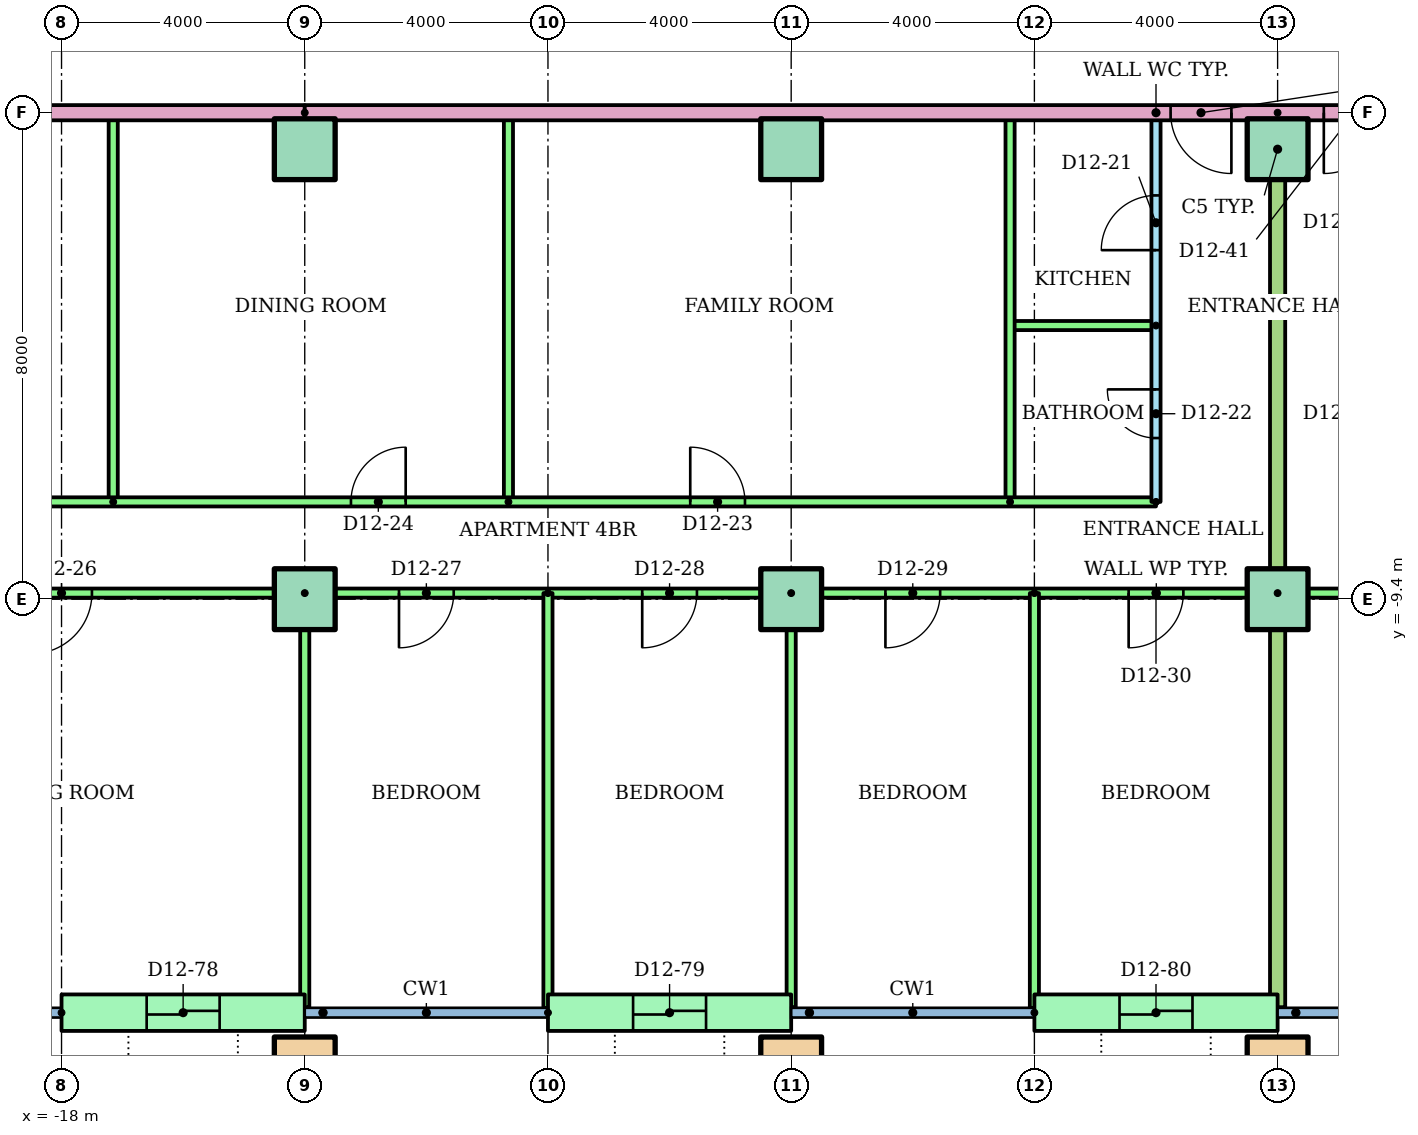
"""IFC4 building model, lengths in metres.
Left out: names, types, materials, properties, quantities, classifications, styles, units other than length and angle.
Written with IfcOpenShell. Run it as: python <this file> out.ifc"""

import sys

from ifc_helpers import new_model, si_unit, direction, frame, frame_2d, origin, origin_2d, place, context, subcontext, project, spatial, rectangle, hollow_rectangle, extrude, element, fill, save


model = new_model("IFC4")
c1 = context("Model", 3, precision=1e-05, world=origin(), true_north=direction((0.0, 1.0)))
c2 = subcontext(c1, "Body", "Model", "MODEL_VIEW")
j1 = project(units=[si_unit("LENGTHUNIT", "METRE"), si_unit("PLANEANGLEUNIT", "RADIAN")], contexts=[c1])
p1 = place(None, origin())
s1 = spatial("IfcSite", under=j1, at=p1, CompositionType="ELEMENT")
p2 = place(p1, origin())
s2 = spatial("IfcBuilding", under=s1, at=p2, CompositionType="ELEMENT")
p3 = place(p2, frame((0.0, 0.0, 48.0)))
s3 = spatial("IfcBuildingStorey", under=s2, at=p3, CompositionType="ELEMENT", Elevation=48.0)
for number, where in (
    (1, (-14.0, -17.1, 0.0)),
    (2, (-6.0, -17.1, 0.0)),
    (3, (2.0, -17.1, 0.0)),
):
    element("IfcColumn", number, at=place(p3, frame(where)), inside=s3, PredefinedType="COLUMN", context=c2, shape_type="SweptSolid", body=[
        extrude(hollow_rectangle(XDim=1.0, YDim=1.0, WallThickness=0.05, at=origin_2d()), origin(), (0.0, 0.0, 1.0), 3.2),
    ])
for number, where in (
    (4, (-14.0, -9.4, 0.0)),
    (5, (-6.0, -9.4, 0.0)),
    (6, (2.0, -9.4, 0.0)),
    (7, (-14.0, -2.0, 0.0)),
    (8, (-6.0, -2.0, 0.0)),
    (9, (2.0, -2.0, 0.0)),
):
    element("IfcColumn", number, at=place(p3, frame(where)), inside=s3, PredefinedType="COLUMN", context=c2, shape_type="SweptSolid", body=[
        extrude(rectangle(XDim=1.0, YDim=1.0, at=origin_2d()), origin(), (0.0, 0.0, 1.0), 3.2),
    ])
p4 = place(p3, frame((-18.0, -16.2, 0.0)))
e10 = element("IfcWall", 10, at=p4, inside=s3, PredefinedType="STANDARD", context=c2, shape_type="SweptSolid", body=[
    extrude(rectangle(XDim=4.0, YDim=0.6, at=frame_2d((2.0, 0.0))), origin(), (0.0, 0.0, 1.0), 2.92),
])
p5 = place(p4, frame((1.4, 0.0, 0.0)))
e11 = element("IfcOpeningElement", 11, at=p5, cuts=e10, PredefinedType="OPENING", context=c2, shape_type="SweptSolid", body=[
    extrude(rectangle(XDim=1.2, YDim=2.1, at=frame_2d((0.6, 1.05))), frame((0.0, 0.31, 0.0), z_axis=(0.0, -1.0, 0.0), x_axis=(1.0, 0.0, 0.0)), (0.0, 0.0, 1.0), 0.62),
])
p6 = place(p3, frame((-10.0, -16.2, 0.0)))
e12 = element("IfcWall", 12, at=p6, inside=s3, PredefinedType="STANDARD", context=c2, shape_type="SweptSolid", body=[
    extrude(rectangle(XDim=4.0, YDim=0.6, at=frame_2d((2.0, 0.0))), origin(), (0.0, 0.0, 1.0), 2.92),
])
p7 = place(p6, frame((1.4, 0.0, 0.0)))
e13 = element("IfcOpeningElement", 13, at=p7, cuts=e12, PredefinedType="OPENING", context=c2, shape_type="SweptSolid", body=[
    extrude(rectangle(XDim=1.2, YDim=2.1, at=frame_2d((0.6, 1.05))), frame((0.0, 0.31, 0.0), z_axis=(0.0, -1.0, 0.0), x_axis=(1.0, 0.0, 0.0)), (0.0, 0.0, 1.0), 0.62),
])
p8 = place(p3, frame((-2.0, -16.2, 0.0)))
e14 = element("IfcWall", 14, at=p8, inside=s3, PredefinedType="STANDARD", context=c2, shape_type="SweptSolid", body=[
    extrude(rectangle(XDim=4.0, YDim=0.6, at=frame_2d((2.0, 0.0))), origin(), (0.0, 0.0, 1.0), 2.92),
])
p9 = place(p8, frame((1.4, 0.0, 0.0)))
e15 = element("IfcOpeningElement", 15, at=p9, cuts=e14, PredefinedType="OPENING", context=c2, shape_type="SweptSolid", body=[
    extrude(rectangle(XDim=1.2, YDim=2.1, at=frame_2d((0.6, 1.05))), frame((0.0, 0.31, 0.0), z_axis=(0.0, -1.0, 0.0), x_axis=(1.0, 0.0, 0.0)), (0.0, 0.0, 1.0), 0.62),
])
p10 = place(p3, frame((0.0, -7.8, 0.0), z_axis=(0.0, 0.0, 1.0), x_axis=(0.0, 1.0, 0.0)))
e16 = element("IfcWall", 16, at=p10, inside=s3, PredefinedType="PARTITIONING", context=c2, shape_type="SweptSolid", body=[
    extrude(rectangle(XDim=6.4, YDim=0.15, at=frame_2d((3.2, 0.0))), origin(), (0.0, 0.0, 1.0), 2.4),
])
p11 = place(p10, frame((4.14, 0.0, 0.0)))
e17 = element("IfcOpeningElement", 17, at=p11, cuts=e16, PredefinedType="OPENING", context=c2, shape_type="SweptSolid", body=[
    extrude(rectangle(XDim=0.9, YDim=2.1, at=frame_2d((0.45, 1.05))), frame((0.0, 0.085, 0.0), z_axis=(0.0, -1.0, 0.0), x_axis=(1.0, 0.0, 0.0)), (0.0, 0.0, 1.0), 0.17),
])
p12 = place(p10, frame((1.05, 0.0, 0.0)))
e18 = element("IfcOpeningElement", 18, at=p12, cuts=e16, PredefinedType="OPENING", context=c2, shape_type="SweptSolid", body=[
    extrude(rectangle(XDim=0.8, YDim=2.1, at=frame_2d((0.4, 1.05))), frame((0.0, 0.085, 0.0), z_axis=(0.0, -1.0, 0.0), x_axis=(1.0, 0.0, 0.0)), (0.0, 0.0, 1.0), 0.17),
])
p13 = place(p3, frame((0.0, -4.9, 0.0), z_axis=(0.0, 0.0, 1.0), x_axis=(-1.0, 0.0, 0.0)))
e19 = element("IfcWall", 19, at=p13, inside=s3, PredefinedType="PARTITIONING", context=c2, shape_type="SweptSolid", body=[
    extrude(rectangle(XDim=2.4, YDim=0.15, at=frame_2d((1.2, 0.0))), origin(), (0.0, 0.0, 1.0), 2.4),
])
for number, where, z_axis, x_axis in (
    (20, (-2.4, -7.8, 0.0), (0.0, 0.0, 1.0), (0.0, 1.0, 0.0)),
    (21, (-10.65, -7.8, 0.0), (0.0, 0.0, 1.0), (0.0, 1.0, 0.0)),
    (22, (-17.15, -7.8, 0.0), (0.0, 0.0, 1.0), (0.0, 1.0, 0.0)),
):
    element("IfcWall", number, at=place(p3, frame(where, z_axis=z_axis, x_axis=x_axis)), inside=s3, PredefinedType="PARTITIONING", context=c2, shape_type="SweptSolid", body=[
        extrude(rectangle(XDim=6.4, YDim=0.15, at=frame_2d((3.2, 0.0))), origin(), (0.0, 0.0, 1.0), 2.4),
    ])
p14 = place(p3, frame((-22.0, -7.8, 0.0)))
e23 = element("IfcWall", 23, at=p14, inside=s3, PredefinedType="PARTITIONING", context=c2, shape_type="SweptSolid", body=[
    extrude(rectangle(XDim=22.0, YDim=0.15, at=frame_2d((11.0, 0.0))), origin(), (0.0, 0.0, 1.0), 2.4),
])
p15 = place(p14, frame((14.34, 0.0, 0.0)))
e24 = element("IfcOpeningElement", 24, at=p15, cuts=e23, PredefinedType="OPENING", context=c2, shape_type="SweptSolid", body=[
    extrude(rectangle(XDim=0.9, YDim=2.1, at=frame_2d((0.45, 1.05))), frame((0.0, 0.085, 0.0), z_axis=(0.0, -1.0, 0.0), x_axis=(1.0, 0.0, 0.0)), (0.0, 0.0, 1.0), 0.17),
])
p16 = place(p14, frame((8.76, 0.0, 0.0)))
e25 = element("IfcOpeningElement", 25, at=p16, cuts=e23, PredefinedType="OPENING", context=c2, shape_type="SweptSolid", body=[
    extrude(rectangle(XDim=0.9, YDim=2.1, at=frame_2d((0.45, 1.05))), frame((0.0, 0.085, 0.0), z_axis=(0.0, -1.0, 0.0), x_axis=(1.0, 0.0, 0.0)), (0.0, 0.0, 1.0), 0.17),
])
p17 = place(p14, frame((1.975, 0.0, 0.0)))
e26 = element("IfcOpeningElement", 26, at=p17, cuts=e23, PredefinedType="OPENING", context=c2, shape_type="SweptSolid", body=[
    extrude(rectangle(XDim=0.9, YDim=2.1, at=frame_2d((0.45, 1.05))), frame((0.0, 0.085, 0.0), z_axis=(0.0, -1.0, 0.0), x_axis=(1.0, 0.0, 0.0)), (0.0, 0.0, 1.0), 0.17),
])
p18 = place(p3, frame((2.0, -9.3, 0.0), z_axis=(0.0, 0.0, 1.0), x_axis=(-1.0, 0.0, 0.0)))
e27 = element("IfcWall", 27, at=p18, inside=s3, PredefinedType="PARTITIONING", context=c2, shape_type="SweptSolid", body=[
    extrude(rectangle(XDim=24.0, YDim=0.15, at=frame_2d((12.0, 0.0))), origin(), (0.0, 0.0, 1.0), 2.4),
])
p19 = place(p18, frame((19.5, 0.0, 0.0)))
e28 = element("IfcOpeningElement", 28, at=p19, cuts=e27, PredefinedType="OPENING", context=c2, shape_type="SweptSolid", body=[
    extrude(rectangle(XDim=1.0, YDim=2.1, at=frame_2d((0.5, 1.05))), frame((0.0, 0.085, 0.0), z_axis=(0.0, -1.0, 0.0), x_axis=(1.0, 0.0, 0.0)), (0.0, 0.0, 1.0), 0.17),
])
p20 = place(p18, frame((13.55, 0.0, 0.0)))
e29 = element("IfcOpeningElement", 29, at=p20, cuts=e27, PredefinedType="OPENING", context=c2, shape_type="SweptSolid", body=[
    extrude(rectangle(XDim=0.9, YDim=2.1, at=frame_2d((0.45, 1.05))), frame((0.0, 0.085, 0.0), z_axis=(0.0, -1.0, 0.0), x_axis=(1.0, 0.0, 0.0)), (0.0, 0.0, 1.0), 0.17),
])
p21 = place(p18, frame((9.55, 0.0, 0.0)))
e30 = element("IfcOpeningElement", 30, at=p21, cuts=e27, PredefinedType="OPENING", context=c2, shape_type="SweptSolid", body=[
    extrude(rectangle(XDim=0.9, YDim=2.1, at=frame_2d((0.45, 1.05))), frame((0.0, 0.085, 0.0), z_axis=(0.0, -1.0, 0.0), x_axis=(1.0, 0.0, 0.0)), (0.0, 0.0, 1.0), 0.17),
])
p22 = place(p18, frame((5.55, 0.0, 0.0)))
e31 = element("IfcOpeningElement", 31, at=p22, cuts=e27, PredefinedType="OPENING", context=c2, shape_type="SweptSolid", body=[
    extrude(rectangle(XDim=0.9, YDim=2.1, at=frame_2d((0.45, 1.05))), frame((0.0, 0.085, 0.0), z_axis=(0.0, -1.0, 0.0), x_axis=(1.0, 0.0, 0.0)), (0.0, 0.0, 1.0), 0.17),
])
p23 = place(p18, frame((1.55, 0.0, 0.0)))
e32 = element("IfcOpeningElement", 32, at=p23, cuts=e27, PredefinedType="OPENING", context=c2, shape_type="SweptSolid", body=[
    extrude(rectangle(XDim=0.9, YDim=2.1, at=frame_2d((0.45, 1.05))), frame((0.0, 0.085, 0.0), z_axis=(0.0, -1.0, 0.0), x_axis=(1.0, 0.0, 0.0)), (0.0, 0.0, 1.0), 0.17),
])
p24 = place(p3, frame((-14.0, -9.3, 0.0), z_axis=(0.0, 0.0, 1.0), x_axis=(0.0, -1.0, 0.0)))
e33 = element("IfcWall", 33, at=p24, inside=s3, PredefinedType="PARTITIONING", context=c2, shape_type="SweptSolid", body=[
    extrude(rectangle(XDim=6.81, YDim=0.15, at=frame_2d((3.405, 0.0))), origin(), (0.0, 0.0, 1.0), 2.4),
])
p25 = place(p3, frame((-10.0, -9.3, 0.0), z_axis=(0.0, 0.0, 1.0), x_axis=(0.0, -1.0, 0.0)))
e34 = element("IfcWall", 34, at=p25, inside=s3, PredefinedType="PARTITIONING", context=c2, shape_type="SweptSolid", body=[
    extrude(rectangle(XDim=6.821, YDim=0.15, at=frame_2d((3.411, 0.0))), origin(), (0.0, 0.0, 1.0), 2.4),
])
p26 = place(p3, frame((-6.0, -9.3, 0.0), z_axis=(0.0, 0.0, 1.0), x_axis=(0.0, -1.0, 0.0)))
e35 = element("IfcWall", 35, at=p26, inside=s3, PredefinedType="PARTITIONING", context=c2, shape_type="SweptSolid", body=[
    extrude(rectangle(XDim=6.81, YDim=0.15, at=frame_2d((3.405, 0.0))), origin(), (0.0, 0.0, 1.0), 2.4),
])
p27 = place(p3, frame((-2.0, -9.3, 0.0), z_axis=(0.0, 0.0, 1.0), x_axis=(0.0, -1.0, 0.0)))
e36 = element("IfcWall", 36, at=p27, inside=s3, PredefinedType="PARTITIONING", context=c2, shape_type="SweptSolid", body=[
    extrude(rectangle(XDim=6.821, YDim=0.15, at=frame_2d((3.411, 0.0))), origin(), (0.0, 0.0, 1.0), 2.4),
])
p28 = place(p3, frame((18.0, -9.3, 0.0), z_axis=(0.0, 0.0, 1.0), x_axis=(-1.0, 0.0, 0.0)))
e37 = element("IfcWall", 37, at=p28, inside=s3, PredefinedType="PARTITIONING", context=c2, shape_type="SweptSolid", body=[
    extrude(rectangle(XDim=16.0, YDim=0.15, at=frame_2d((8.0, 0.0))), origin(), (0.0, 0.0, 1.0), 2.4),
])
p29 = place(p28, frame((13.55, 0.0, 0.0)))
e38 = element("IfcOpeningElement", 38, at=p29, cuts=e37, PredefinedType="OPENING", context=c2, shape_type="SweptSolid", body=[
    extrude(rectangle(XDim=0.9, YDim=2.1, at=frame_2d((0.45, 1.05))), frame((0.0, 0.085, 0.0), z_axis=(0.0, -1.0, 0.0), x_axis=(1.0, 0.0, 0.0)), (0.0, 0.0, 1.0), 0.17),
])
p30 = place(p28, frame((9.55, 0.0, 0.0)))
e39 = element("IfcOpeningElement", 39, at=p30, cuts=e37, PredefinedType="OPENING", context=c2, shape_type="SweptSolid", body=[
    extrude(rectangle(XDim=0.9, YDim=2.1, at=frame_2d((0.45, 1.05))), frame((0.0, 0.085, 0.0), z_axis=(0.0, -1.0, 0.0), x_axis=(1.0, 0.0, 0.0)), (0.0, 0.0, 1.0), 0.17),
])
p31 = place(p28, frame((5.55, 0.0, 0.0)))
e40 = element("IfcOpeningElement", 40, at=p31, cuts=e37, PredefinedType="OPENING", context=c2, shape_type="SweptSolid", body=[
    extrude(rectangle(XDim=0.9, YDim=2.1, at=frame_2d((0.45, 1.05))), frame((0.0, 0.085, 0.0), z_axis=(0.0, -1.0, 0.0), x_axis=(1.0, 0.0, 0.0)), (0.0, 0.0, 1.0), 0.17),
])
p32 = place(p28, frame((1.5, 0.0, 0.0)))
e41 = element("IfcOpeningElement", 41, at=p32, cuts=e37, PredefinedType="OPENING", context=c2, shape_type="SweptSolid", body=[
    extrude(rectangle(XDim=1.0, YDim=2.1, at=frame_2d((0.5, 1.05))), frame((0.0, 0.085, 0.0), z_axis=(0.0, -1.0, 0.0), x_axis=(1.0, 0.0, 0.0)), (0.0, 0.0, 1.0), 0.17),
])
p33 = place(p3, frame((2.0, -1.4, 0.0), z_axis=(0.0, 0.0, 1.0), x_axis=(0.0, -1.0, 0.0)))
e42 = element("IfcWall", 42, at=p33, inside=s3, PredefinedType="PARTITIONING", context=c2, shape_type="SweptSolid", body=[
    extrude(rectangle(XDim=14.71, YDim=0.25, at=frame_2d((7.355, 0.0))), origin(), (0.0, 0.0, 1.0), 2.4),
])
p34 = place(p3, frame((-14.0, -1.4, 0.0), z_axis=(0.0, 0.0, 1.0), x_axis=(-1.0, 0.0, 0.0)))
e43 = element("IfcWall", 43, at=p34, inside=s3, PredefinedType="PARTITIONING", context=c2, shape_type="SweptSolid", body=[
    extrude(rectangle(XDim=15.0, YDim=0.25, at=frame_2d((7.5, 0.0))), origin(), (0.0, 0.0, 1.0), 2.4),
])
p35 = place(p34, frame((8.76, 0.0, 0.0)))
e44 = element("IfcOpeningElement", 44, at=p35, cuts=e43, PredefinedType="OPENING", context=c2, shape_type="SweptSolid", body=[
    extrude(rectangle(XDim=1.0, YDim=2.1, at=frame_2d((0.5, 1.05))), frame((0.0, 0.135, 0.0), z_axis=(0.0, -1.0, 0.0), x_axis=(1.0, 0.0, 0.0)), (0.0, 0.0, 1.0), 0.27),
])
p36 = place(p3, frame((14.0, -1.4, 0.0), z_axis=(0.0, 0.0, 1.0), x_axis=(-1.0, 0.0, 0.0)))
e45 = element("IfcWall", 45, at=p36, inside=s3, PredefinedType="PARTITIONING", context=c2, shape_type="SweptSolid", body=[
    extrude(rectangle(XDim=28.0, YDim=0.25, at=frame_2d((14.0, 0.0))), origin(), (0.0, 0.0, 1.0), 2.4),
])
p37 = place(p36, frame((12.76, 0.0, 0.0)))
e46 = element("IfcOpeningElement", 46, at=p37, cuts=e45, PredefinedType="OPENING", context=c2, shape_type="SweptSolid", body=[
    extrude(rectangle(XDim=1.0, YDim=2.1, at=frame_2d((0.5, 1.05))), frame((0.0, 0.135, 0.0), z_axis=(0.0, -1.0, 0.0), x_axis=(1.0, 0.0, 0.0)), (0.0, 0.0, 1.0), 0.27),
])
p38 = place(p36, frame((10.24, 0.0, 0.0)))
e47 = element("IfcOpeningElement", 47, at=p38, cuts=e45, PredefinedType="OPENING", context=c2, shape_type="SweptSolid", body=[
    extrude(rectangle(XDim=1.0, YDim=2.1, at=frame_2d((0.5, 1.05))), frame((0.0, 0.135, 0.0), z_axis=(0.0, -1.0, 0.0), x_axis=(1.0, 0.0, 0.0)), (0.0, 0.0, 1.0), 0.27),
])
p39 = place(p11, origin())
e48 = element("IfcDoor", 48, at=p39, inside=s3, OperationType="SINGLE_SWING_LEFT", PredefinedType="DOOR", context=c2, shape_type="SweptSolid", body=[
    extrude(rectangle(XDim=0.9, YDim=2.1, at=frame_2d((0.45, 1.05))), frame((0.0, 0.025, 0.0), z_axis=(0.0, -1.0, 0.0), x_axis=(1.0, 0.0, 0.0)), (0.0, 0.0, 1.0), 0.05),
])
fill(e17, e48)
p40 = place(p12, origin())
e49 = element("IfcDoor", 49, at=p40, inside=s3, OperationType="SINGLE_SWING_RIGHT", PredefinedType="DOOR", context=c2, shape_type="SweptSolid", body=[
    extrude(rectangle(XDim=0.8, YDim=2.1, at=frame_2d((0.4, 1.05))), frame((0.0, 0.025, 0.0), z_axis=(0.0, -1.0, 0.0), x_axis=(1.0, 0.0, 0.0)), (0.0, 0.0, 1.0), 0.05),
])
fill(e18, e49)
p41 = place(p15, origin())
e50 = element("IfcDoor", 50, at=p41, inside=s3, OperationType="SINGLE_SWING_LEFT", PredefinedType="DOOR", context=c2, shape_type="SweptSolid", body=[
    extrude(rectangle(XDim=0.9, YDim=2.1, at=frame_2d((0.45, 1.05))), frame((0.0, 0.025, 0.0), z_axis=(0.0, -1.0, 0.0), x_axis=(1.0, 0.0, 0.0)), (0.0, 0.0, 1.0), 0.05),
])
fill(e24, e50)
p42 = place(p16, origin())
e51 = element("IfcDoor", 51, at=p42, inside=s3, OperationType="SINGLE_SWING_RIGHT", PredefinedType="DOOR", context=c2, shape_type="SweptSolid", body=[
    extrude(rectangle(XDim=0.9, YDim=2.1, at=frame_2d((0.45, 1.05))), frame((0.0, 0.025, 0.0), z_axis=(0.0, -1.0, 0.0), x_axis=(1.0, 0.0, 0.0)), (0.0, 0.0, 1.0), 0.05),
])
fill(e25, e51)
p43 = place(p19, origin())
e52 = element("IfcDoor", 52, at=p43, inside=s3, OperationType="SINGLE_SWING_RIGHT", PredefinedType="DOOR", context=c2, shape_type="SweptSolid", body=[
    extrude(rectangle(XDim=1.0, YDim=2.1, at=frame_2d((0.5, 1.05))), frame((0.0, 0.025, 0.0), z_axis=(0.0, -1.0, 0.0), x_axis=(1.0, 0.0, 0.0)), (0.0, 0.0, 1.0), 0.05),
])
fill(e28, e52)
p44 = place(p20, origin())
e53 = element("IfcDoor", 53, at=p44, inside=s3, OperationType="SINGLE_SWING_RIGHT", PredefinedType="DOOR", context=c2, shape_type="SweptSolid", body=[
    extrude(rectangle(XDim=0.9, YDim=2.1, at=frame_2d((0.45, 1.05))), frame((0.0, 0.025, 0.0), z_axis=(0.0, -1.0, 0.0), x_axis=(1.0, 0.0, 0.0)), (0.0, 0.0, 1.0), 0.05),
])
fill(e29, e53)
p45 = place(p21, origin())
e54 = element("IfcDoor", 54, at=p45, inside=s3, OperationType="SINGLE_SWING_RIGHT", PredefinedType="DOOR", context=c2, shape_type="SweptSolid", body=[
    extrude(rectangle(XDim=0.9, YDim=2.1, at=frame_2d((0.45, 1.05))), frame((0.0, 0.025, 0.0), z_axis=(0.0, -1.0, 0.0), x_axis=(1.0, 0.0, 0.0)), (0.0, 0.0, 1.0), 0.05),
])
fill(e30, e54)
p46 = place(p22, origin())
e55 = element("IfcDoor", 55, at=p46, inside=s3, OperationType="SINGLE_SWING_RIGHT", PredefinedType="DOOR", context=c2, shape_type="SweptSolid", body=[
    extrude(rectangle(XDim=0.9, YDim=2.1, at=frame_2d((0.45, 1.05))), frame((0.0, 0.025, 0.0), z_axis=(0.0, -1.0, 0.0), x_axis=(1.0, 0.0, 0.0)), (0.0, 0.0, 1.0), 0.05),
])
fill(e31, e55)
p47 = place(p23, origin())
e56 = element("IfcDoor", 56, at=p47, inside=s3, OperationType="SINGLE_SWING_RIGHT", PredefinedType="DOOR", context=c2, shape_type="SweptSolid", body=[
    extrude(rectangle(XDim=0.9, YDim=2.1, at=frame_2d((0.45, 1.05))), frame((0.0, 0.025, 0.0), z_axis=(0.0, -1.0, 0.0), x_axis=(1.0, 0.0, 0.0)), (0.0, 0.0, 1.0), 0.05),
])
fill(e32, e56)
p48 = place(p37, origin())
e57 = element("IfcDoor", 57, at=p48, inside=s3, OperationType="SINGLE_SWING_LEFT", PredefinedType="DOOR", context=c2, shape_type="SweptSolid", body=[
    extrude(rectangle(XDim=1.0, YDim=2.1, at=frame_2d((0.5, 1.05))), frame((0.0, 0.025, 0.0), z_axis=(0.0, -1.0, 0.0), x_axis=(1.0, 0.0, 0.0)), (0.0, 0.0, 1.0), 0.05),
])
fill(e46, e57)
p49 = place(p38, origin())
e58 = element("IfcDoor", 58, at=p49, inside=s3, OperationType="SINGLE_SWING_RIGHT", PredefinedType="DOOR", context=c2, shape_type="SweptSolid", body=[
    extrude(rectangle(XDim=1.0, YDim=2.1, at=frame_2d((0.5, 1.05))), frame((0.0, 0.025, 0.0), z_axis=(0.0, -1.0, 0.0), x_axis=(1.0, 0.0, 0.0)), (0.0, 0.0, 1.0), 0.05),
])
fill(e47, e58)
p50 = place(p5, origin())
e59 = element("IfcDoor", 59, at=p50, inside=s3, OperationType="SLIDING_TO_LEFT", PredefinedType="DOOR", context=c2, shape_type="SweptSolid", body=[
    extrude(rectangle(XDim=1.2, YDim=2.1, at=frame_2d((0.6, 1.05))), frame((0.0, 0.025, 0.0), z_axis=(0.0, -1.0, 0.0), x_axis=(1.0, 0.0, 0.0)), (0.0, 0.0, 1.0), 0.05),
])
fill(e11, e59)
p51 = place(p7, origin())
e60 = element("IfcDoor", 60, at=p51, inside=s3, OperationType="SLIDING_TO_LEFT", PredefinedType="DOOR", context=c2, shape_type="SweptSolid", body=[
    extrude(rectangle(XDim=1.2, YDim=2.1, at=frame_2d((0.6, 1.05))), frame((0.0, 0.025, 0.0), z_axis=(0.0, -1.0, 0.0), x_axis=(1.0, 0.0, 0.0)), (0.0, 0.0, 1.0), 0.05),
])
fill(e13, e60)
p52 = place(p9, origin())
e61 = element("IfcDoor", 61, at=p52, inside=s3, OperationType="SLIDING_TO_LEFT", PredefinedType="DOOR", context=c2, shape_type="SweptSolid", body=[
    extrude(rectangle(XDim=1.2, YDim=2.1, at=frame_2d((0.6, 1.05))), frame((0.0, 0.025, 0.0), z_axis=(0.0, -1.0, 0.0), x_axis=(1.0, 0.0, 0.0)), (0.0, 0.0, 1.0), 0.05),
])
fill(e15, e61)
save(model, sys.argv[1])
